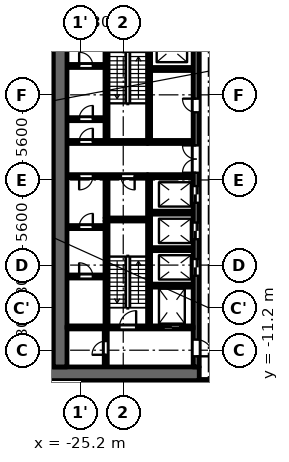
"""IFC4 building model, lengths in metres.
Left out: names, types, materials, properties, quantities, classifications, styles, units other than length and angle.
Written with IfcOpenShell. Run it as: python <this file> out.ifc"""

import sys

from ifc_helpers import new_model, si_unit, direction, frame, frame_2d, origin, origin_2d, place, context, subcontext, project, spatial, polyline, rectangle, outline, extrude, element, fill, save


model = new_model("IFC4")
c1 = context("Model", 3, precision=1e-05, world=origin(), true_north=direction((0.0, 1.0)))
c2 = subcontext(c1, "Body", "Model", "MODEL_VIEW")
j1 = project(units=[si_unit("LENGTHUNIT", "METRE"), si_unit("PLANEANGLEUNIT", "RADIAN")], contexts=[c1])
p1 = place(None, origin())
s1 = spatial("IfcSite", under=j1, at=p1, CompositionType="ELEMENT")
p2 = place(p1, origin())
s2 = spatial("IfcBuilding", under=s1, at=p2, CompositionType="ELEMENT")
p3 = place(p2, frame((0.0, 0.0, -4.5)))
s3 = spatial("IfcBuildingStorey", under=s2, at=p3, CompositionType="ELEMENT", Elevation=-4.5)
p4 = place(p3, frame((0.0, 0.0, -0.5)))
e1 = element("IfcWall", 1, at=p4, inside=s3, PredefinedType="SOLIDWALL", context=c2, shape_type="SweptSolid", body=[
    extrude(outline(polyline([(-28.944, -17.191), (-27.425, -19.426), (-26.851, -20.0), (-26.144, -20.0), (-27.038, -19.105), (-28.472, -16.996), (-28.95, -14.49), (-28.95, -10.0), (-29.45, -10.0), (-29.45, -14.537), (-28.944, -17.191)])), origin(), (0.0, 0.0, 1.0), 5.0),
])
for number, where, z_axis, x_axis in (
    (2, (-28.0, 5.6, 0.0), (0.0, 0.0, 1.0), (1.0, 0.0, 0.0)),
    (3, (-28.0, 0.0, 0.0), (0.0, 0.0, 1.0), (1.0, 0.0, 0.0)),
    (4, (-28.0, -5.6, 0.0), (0.0, 0.0, 1.0), (1.0, 0.0, 0.0)),
    (5, (-28.0, -11.2, 0.0), (0.0, 0.0, 1.0), (1.0, 0.0, 0.0)),
):
    element("IfcColumn", number, at=place(p3, frame(where, z_axis=z_axis, x_axis=x_axis)), inside=s3, PredefinedType="COLUMN", context=c2, shape_type="SweptSolid", body=[
        extrude(rectangle(XDim=1.8, YDim=1.8, at=origin_2d()), origin(), (0.0, 0.0, 1.0), 4.5),
    ])
p5 = place(p3, frame((-23.5, -2.5, 0.0), z_axis=(0.0, 0.0, 1.0), x_axis=(0.0, 1.0, 0.0)))
e6 = element("IfcWall", 6, at=p5, inside=s3, PredefinedType="PARTITIONING", context=c2, shape_type="SweptSolid", body=[
    extrude(rectangle(XDim=2.65, YDim=0.2, at=frame_2d((1.325, 0.0))), origin(), (0.0, 0.0, 1.0), 4.05),
])
p6 = place(p3, frame((-20.7, 2.6, 0.0), z_axis=(0.0, 0.0, 1.0), x_axis=(0.0, 1.0, 0.0)))
e7 = element("IfcWall", 7, at=p6, inside=s3, PredefinedType="SHEAR", context=c2, shape_type="SweptSolid", body=[
    extrude(rectangle(XDim=7.0, YDim=0.2, at=frame_2d((3.5, 0.0))), origin(), (0.0, 0.0, 1.0), 4.05),
])
p7 = place(p3, frame((-20.7, -9.6, 0.0), z_axis=(0.0, 0.0, 1.0), x_axis=(0.0, 1.0, 0.0)))
e8 = element("IfcWall", 8, at=p7, inside=s3, PredefinedType="SHEAR", context=c2, shape_type="SweptSolid", body=[
    extrude(rectangle(XDim=9.75, YDim=0.2, at=frame_2d((4.875, 0.0))), origin(), (0.0, 0.0, 1.0), 4.05),
])
p8 = place(p3, frame((-20.8, 2.5, 0.0), z_axis=(0.0, 0.0, 1.0), x_axis=(-1.0, 0.0, 0.0)))
e9 = element("IfcWall", 9, at=p8, inside=s3, PredefinedType="SHEAR", context=c2, shape_type="SweptSolid", body=[
    extrude(rectangle(XDim=5.3, YDim=0.2, at=frame_2d((2.65, 0.0))), origin(), (0.0, 0.0, 1.0), 4.05),
])
p9 = place(p8, frame((3.6, 0.0, 0.0)))
e10 = element("IfcOpeningElement", 10, at=p9, cuts=e9, PredefinedType="OPENING", context=c2, shape_type="SweptSolid", body=[
    extrude(rectangle(XDim=0.9, YDim=2.1, at=frame_2d((0.45, 1.05))), frame((0.0, 0.11, 0.0), z_axis=(0.0, -1.0, 0.0), x_axis=(1.0, 0.0, 0.0)), (0.0, 0.0, 1.0), 0.22),
])
p10 = place(p3, frame((-20.8, 0.25, 0.0), z_axis=(0.0, 0.0, 1.0), x_axis=(-1.0, 0.0, 0.0)))
e11 = element("IfcWall", 11, at=p10, inside=s3, PredefinedType="PARTITIONING", context=c2, shape_type="SweptSolid", body=[
    extrude(rectangle(XDim=5.3, YDim=0.2, at=frame_2d((2.65, 0.0))), origin(), (0.0, 0.0, 1.0), 4.05),
])
p11 = place(p10, frame((0.85, 0.0, 0.0)))
e12 = element("IfcOpeningElement", 12, at=p11, cuts=e11, PredefinedType="OPENING", context=c2, shape_type="SweptSolid", body=[
    extrude(rectangle(XDim=0.9, YDim=2.1, at=frame_2d((0.45, 1.05))), frame((0.0, 0.11, 0.0), z_axis=(0.0, -1.0, 0.0), x_axis=(1.0, 0.0, 0.0)), (0.0, 0.0, 1.0), 0.22),
])
p12 = place(p10, frame((3.6, 0.0, 0.0)))
e13 = element("IfcOpeningElement", 13, at=p12, cuts=e11, PredefinedType="OPENING", context=c2, shape_type="SweptSolid", body=[
    extrude(rectangle(XDim=0.9, YDim=2.1, at=frame_2d((0.45, 1.05))), frame((0.0, 0.11, 0.0), z_axis=(0.0, -1.0, 0.0), x_axis=(1.0, 0.0, 0.0)), (0.0, 0.0, 1.0), 0.22),
])
p13 = place(p3, frame((-17.4, -12.75, 0.0), z_axis=(0.0, 0.0, 1.0), x_axis=(-1.0, 0.0, 0.0)))
e14 = element("IfcWall", 14, at=p13, inside=s3, PredefinedType="SHEAR", context=c2, shape_type="SweptSolid", body=[
    extrude(rectangle(XDim=10.4, YDim=0.9, at=frame_2d((5.2, 0.0))), origin(), (0.0, 0.0, 1.0), 4.05),
])
p14 = place(p3, frame((-17.6, -12.3, 0.0), z_axis=(0.0, 0.0, 1.0), x_axis=(0.0, 1.0, 0.0)))
e15 = element("IfcWall", 15, at=p14, inside=s3, PredefinedType="SHEAR", context=c2, shape_type="SweptSolid", body=[
    extrude(rectangle(XDim=24.6, YDim=0.4, at=frame_2d((12.3, 0.0))), origin(), (0.0, 0.0, 1.0), 4.05),
])
p15 = place(p14, frame((6.0, 0.0, 0.0)))
e16 = element("IfcOpeningElement", 16, at=p15, cuts=e15, PredefinedType="OPENING", context=c2, shape_type="SweptSolid", body=[
    extrude(rectangle(XDim=1.1, YDim=2.1, at=frame_2d((0.55, 1.05))), frame((0.0, 0.21, 0.0), z_axis=(0.0, -1.0, 0.0), x_axis=(1.0, 0.0, 0.0)), (0.0, 0.0, 1.0), 0.42),
])
p16 = place(p14, frame((8.4, 0.0, 0.0)))
e17 = element("IfcOpeningElement", 17, at=p16, cuts=e15, PredefinedType="OPENING", context=c2, shape_type="SweptSolid", body=[
    extrude(rectangle(XDim=1.1, YDim=2.1, at=frame_2d((0.55, 1.05))), frame((0.0, 0.21, 0.0), z_axis=(0.0, -1.0, 0.0), x_axis=(1.0, 0.0, 0.0)), (0.0, 0.0, 1.0), 0.42),
])
p17 = place(p14, frame((10.8, 0.0, 0.0)))
e18 = element("IfcOpeningElement", 18, at=p17, cuts=e15, PredefinedType="OPENING", context=c2, shape_type="SweptSolid", body=[
    extrude(rectangle(XDim=1.1, YDim=2.1, at=frame_2d((0.55, 1.05))), frame((0.0, 0.21, 0.0), z_axis=(0.0, -1.0, 0.0), x_axis=(1.0, 0.0, 0.0)), (0.0, 0.0, 1.0), 0.42),
])
p18 = place(p14, frame((16.75, 0.0, 0.0)))
e19 = element("IfcOpeningElement", 19, at=p18, cuts=e15, PredefinedType="OPENING", context=c2, shape_type="SweptSolid", body=[
    extrude(rectangle(XDim=0.9, YDim=2.1, at=frame_2d((0.45, 1.05))), frame((0.0, 0.21, 0.0), z_axis=(0.0, -1.0, 0.0), x_axis=(1.0, 0.0, 0.0)), (0.0, 0.0, 1.0), 0.42),
])
p19 = place(p14, frame((22.8, 0.0, 0.0)))
e20 = element("IfcOpeningElement", 20, at=p19, cuts=e15, PredefinedType="OPENING", context=c2, shape_type="SweptSolid", body=[
    extrude(rectangle(XDim=1.1, YDim=2.1, at=frame_2d((0.55, 1.05))), frame((0.0, 0.21, 0.0), z_axis=(0.0, -1.0, 0.0), x_axis=(1.0, 0.0, 0.0)), (0.0, 0.0, 1.0), 0.42),
])
p20 = place(p14, frame((0.7, 0.0, 0.0)))
e21 = element("IfcOpeningElement", 21, at=p20, cuts=e15, PredefinedType="OPENING", context=c2, shape_type="SweptSolid", body=[
    extrude(rectangle(XDim=1.1, YDim=2.1, at=frame_2d((0.55, 1.05))), frame((0.0, 0.21, 0.0), z_axis=(0.0, -1.0, 0.0), x_axis=(1.0, 0.0, 0.0)), (0.0, 0.0, 1.0), 0.42),
])
p21 = place(p14, frame((12.775, 0.0, 0.0)))
e22 = element("IfcOpeningElement", 22, at=p21, cuts=e15, PredefinedType="OPENING", context=c2, shape_type="SweptSolid", body=[
    extrude(rectangle(XDim=1.8, YDim=2.1, at=frame_2d((0.9, 1.05))), frame((0.0, 0.21, 0.0), z_axis=(0.0, -1.0, 0.0), x_axis=(1.0, 0.0, 0.0)), (0.0, 0.0, 1.0), 0.42),
])
p22 = place(p3, frame((-26.55, -12.3, 0.0), z_axis=(0.0, 0.0, 1.0), x_axis=(0.0, 1.0, 0.0)))
e23 = element("IfcWall", 23, at=p22, inside=s3, PredefinedType="SHEAR", context=c2, shape_type="SweptSolid", body=[
    extrude(rectangle(XDim=24.6, YDim=0.9, at=frame_2d((12.3, 0.0))), origin(), (0.0, 0.0, 1.0), 4.05),
])
p23 = place(p3, frame((-23.55, -12.3, 0.0), z_axis=(0.0, 0.0, 1.0), x_axis=(0.0, 1.0, 0.0)))
e24 = element("IfcWall", 24, at=p23, inside=s3, PredefinedType="PARTITIONING", context=c2, shape_type="SweptSolid", body=[
    extrude(rectangle(XDim=2.5, YDim=0.2, at=frame_2d((1.25, 0.0))), origin(), (0.0, 0.0, 1.0), 4.05),
])
p24 = place(p23, frame((0.8, 0.0, 0.0)))
e25 = element("IfcOpeningElement", 25, at=p24, cuts=e24, PredefinedType="OPENING", context=c2, shape_type="SweptSolid", body=[
    extrude(rectangle(XDim=0.9, YDim=2.1, at=frame_2d((0.45, 1.05))), frame((0.0, 0.11, 0.0), z_axis=(0.0, -1.0, 0.0), x_axis=(1.0, 0.0, 0.0)), (0.0, 0.0, 1.0), 0.22),
])
p25 = place(p3, frame((-23.6, -6.35, 0.0), z_axis=(0.0, 0.0, 1.0), x_axis=(-1.0, 0.0, 0.0)))
e26 = element("IfcWall", 26, at=p25, inside=s3, PredefinedType="PARTITIONING", context=c2, shape_type="SweptSolid", body=[
    extrude(rectangle(XDim=2.5, YDim=0.2, at=frame_2d((1.25, 0.0))), origin(), (0.0, 0.0, 1.0), 4.05),
])
p26 = place(p25, frame((0.8, 0.0, 0.0)))
e27 = element("IfcOpeningElement", 27, at=p26, cuts=e26, PredefinedType="OPENING", context=c2, shape_type="SweptSolid", body=[
    extrude(rectangle(XDim=0.9, YDim=2.1, at=frame_2d((0.45, 1.05))), frame((0.0, 0.11, 0.0), z_axis=(0.0, -1.0, 0.0), x_axis=(1.0, 0.0, 0.0)), (0.0, 0.0, 1.0), 0.22),
])
p27 = place(p3, frame((-23.6, -3.1, 0.0), z_axis=(0.0, 0.0, 1.0), x_axis=(-1.0, 0.0, 0.0)))
e28 = element("IfcWall", 28, at=p27, inside=s3, PredefinedType="PARTITIONING", context=c2, shape_type="SweptSolid", body=[
    extrude(rectangle(XDim=2.5, YDim=0.2, at=frame_2d((1.25, 0.0))), origin(), (0.0, 0.0, 1.0), 4.05),
])
p28 = place(p27, frame((0.8, 0.0, 0.0)))
e29 = element("IfcOpeningElement", 29, at=p28, cuts=e28, PredefinedType="OPENING", context=c2, shape_type="SweptSolid", body=[
    extrude(rectangle(XDim=0.9, YDim=2.1, at=frame_2d((0.45, 1.05))), frame((0.0, 0.11, 0.0), z_axis=(0.0, -1.0, 0.0), x_axis=(1.0, 0.0, 0.0)), (0.0, 0.0, 1.0), 0.22),
])
p29 = place(p3, frame((-23.6, 4.0, 0.0), z_axis=(0.0, 0.0, 1.0), x_axis=(-1.0, 0.0, 0.0)))
e30 = element("IfcWall", 30, at=p29, inside=s3, PredefinedType="PARTITIONING", context=c2, shape_type="SweptSolid", body=[
    extrude(rectangle(XDim=2.5, YDim=0.2, at=frame_2d((1.25, 0.0))), origin(), (0.0, 0.0, 1.0), 4.05),
])
p30 = place(p29, frame((0.8, 0.0, 0.0)))
e31 = element("IfcOpeningElement", 31, at=p30, cuts=e30, PredefinedType="OPENING", context=c2, shape_type="SweptSolid", body=[
    extrude(rectangle(XDim=0.9, YDim=2.1, at=frame_2d((0.45, 1.05))), frame((0.0, 0.11, 0.0), z_axis=(0.0, -1.0, 0.0), x_axis=(1.0, 0.0, 0.0)), (0.0, 0.0, 1.0), 0.22),
])
p31 = place(p3, frame((-23.6, 7.5, 0.0), z_axis=(0.0, 0.0, 1.0), x_axis=(-1.0, 0.0, 0.0)))
e32 = element("IfcWall", 32, at=p31, inside=s3, PredefinedType="PARTITIONING", context=c2, shape_type="SweptSolid", body=[
    extrude(rectangle(XDim=2.5, YDim=0.2, at=frame_2d((1.25, 0.0))), origin(), (0.0, 0.0, 1.0), 4.05),
])
p32 = place(p31, frame((0.8, 0.0, 0.0)))
e33 = element("IfcOpeningElement", 33, at=p32, cuts=e32, PredefinedType="OPENING", context=c2, shape_type="SweptSolid", body=[
    extrude(rectangle(XDim=0.9, YDim=2.1, at=frame_2d((0.45, 1.05))), frame((0.0, 0.11, 0.0), z_axis=(0.0, -1.0, 0.0), x_axis=(1.0, 0.0, 0.0)), (0.0, 0.0, 1.0), 0.22),
])
p33 = place(p3, frame((-17.8, -9.7, 0.0), z_axis=(0.0, 0.0, 1.0), x_axis=(-1.0, 0.0, 0.0)))
e34 = element("IfcWall", 34, at=p33, inside=s3, PredefinedType="SHEAR", context=c2, shape_type="SweptSolid", body=[
    extrude(rectangle(XDim=8.3, YDim=0.2, at=frame_2d((4.15, 0.0))), origin(), (0.0, 0.0, 1.0), 4.05),
])
p34 = place(p33, frame((0.85, 0.0, 0.0)))
e35 = element("IfcOpeningElement", 35, at=p34, cuts=e34, PredefinedType="OPENING", context=c2, shape_type="SweptSolid", body=[
    extrude(rectangle(XDim=1.1, YDim=2.1, at=frame_2d((0.55, 1.05))), frame((0.0, 0.11, 0.0), z_axis=(0.0, -1.0, 0.0), x_axis=(1.0, 0.0, 0.0)), (0.0, 0.0, 1.0), 0.22),
])
p35 = place(p33, frame((3.75, 0.0, 0.0)))
e36 = element("IfcOpeningElement", 36, at=p35, cuts=e34, PredefinedType="OPENING", context=c2, shape_type="SweptSolid", body=[
    extrude(rectangle(XDim=1.1, YDim=2.1, at=frame_2d((0.55, 1.05))), frame((0.0, 0.11, 0.0), z_axis=(0.0, -1.0, 0.0), x_axis=(1.0, 0.0, 0.0)), (0.0, 0.0, 1.0), 0.22),
])
for number, where, z_axis, x_axis in (
    (37, (-17.8, -6.95, 0.0), (0.0, 0.0, 1.0), (-1.0, 0.0, 0.0)),
    (38, (-17.8, -4.55, 0.0), (0.0, 0.0, 1.0), (-1.0, 0.0, 0.0)),
    (39, (-17.8, -2.15, 0.0), (0.0, 0.0, 1.0), (-1.0, 0.0, 0.0)),
):
    element("IfcWall", number, at=place(p3, frame(where, z_axis=z_axis, x_axis=x_axis)), inside=s3, PredefinedType="PARTITIONING", context=c2, shape_type="SweptSolid", body=[
        extrude(rectangle(XDim=2.8, YDim=0.2, at=frame_2d((1.4, 0.0))), origin(), (0.0, 0.0, 1.0), 4.05),
    ])
for number, where, z_axis, x_axis in (
    (40, (-17.8, 0.25, 0.0), (0.0, 0.0, 1.0), (-1.0, 0.0, 0.0)),
    (41, (-17.8, 2.5, 0.0), (0.0, 0.0, 1.0), (-1.0, 0.0, 0.0)),
):
    element("IfcWall", number, at=place(p3, frame(where, z_axis=z_axis, x_axis=x_axis)), inside=s3, PredefinedType="PARTITIONING", context=c2, shape_type="SweptSolid", body=[
        extrude(rectangle(XDim=3.0, YDim=0.2, at=frame_2d((1.5, 0.0))), origin(), (0.0, 0.0, 1.0), 4.05),
    ])
p36 = place(p3, frame((-17.8, 7.3, 0.0), z_axis=(0.0, 0.0, 1.0), x_axis=(-1.0, 0.0, 0.0)))
e42 = element("IfcWall", 42, at=p36, inside=s3, PredefinedType="PARTITIONING", context=c2, shape_type="SweptSolid", body=[
    extrude(rectangle(XDim=2.8, YDim=0.2, at=frame_2d((1.4, 0.0))), origin(), (0.0, 0.0, 1.0), 4.05),
])
p37 = place(p3, frame((-23.5, 2.6, 0.0), z_axis=(0.0, 0.0, 1.0), x_axis=(0.0, 1.0, 0.0)))
e43 = element("IfcWall", 43, at=p37, inside=s3, PredefinedType="SHEAR", context=c2, shape_type="SweptSolid", body=[
    extrude(rectangle(XDim=7.0, YDim=0.2, at=frame_2d((3.5, 0.0))), origin(), (0.0, 0.0, 1.0), 4.05),
])
p38 = place(p3, frame((-23.5, -9.6, 0.0), z_axis=(0.0, 0.0, 1.0), x_axis=(0.0, 1.0, 0.0)))
e44 = element("IfcWall", 44, at=p38, inside=s3, PredefinedType="SHEAR", context=c2, shape_type="SweptSolid", body=[
    extrude(rectangle(XDim=6.9, YDim=0.2, at=frame_2d((3.45, 0.0))), origin(), (0.0, 0.0, 1.0), 4.05),
])
p39 = place(p3, frame((-20.8, -2.6, 0.0), z_axis=(0.0, 0.0, 1.0), x_axis=(-1.0, 0.0, 0.0)))
e45 = element("IfcWall", 45, at=p39, inside=s3, PredefinedType="SHEAR", context=c2, shape_type="SweptSolid", body=[
    extrude(rectangle(XDim=2.8, YDim=0.2, at=frame_2d((1.4, 0.0))), origin(), (0.0, 0.0, 1.0), 4.05),
])
p40 = place(p3, frame((-17.4, -13.2, 0.0), z_axis=(0.0, 0.0, 1.0), x_axis=(1.0, 0.0, 0.0)))
e46 = element("IfcWall", 46, at=p40, inside=s3, PredefinedType="PARTITIONING", context=c2, shape_type="SweptSolid", body=[
    extrude(rectangle(XDim=34.8, YDim=0.15, at=frame_2d((17.4, 0.0))), origin(), (0.0, 0.0, 1.0), 4.05),
])
p41 = place(p40, frame((16.05, 0.0, 0.0)))
e47 = element("IfcOpeningElement", 47, at=p41, cuts=e46, PredefinedType="OPENING", context=c2, shape_type="SweptSolid", body=[
    extrude(rectangle(XDim=1.2, YDim=2.1, at=frame_2d((0.6, 1.05))), frame((0.0, 0.085, 0.0), z_axis=(0.0, -1.0, 0.0), x_axis=(1.0, 0.0, 0.0)), (0.0, 0.0, 1.0), 0.17),
])
p42 = place(p40, frame((0.65, 0.0, 0.0)))
e48 = element("IfcOpeningElement", 48, at=p42, cuts=e46, PredefinedType="OPENING", context=c2, shape_type="SweptSolid", body=[
    extrude(rectangle(XDim=1.0, YDim=2.1, at=frame_2d((0.5, 1.05))), frame((0.0, 0.085, 0.0), z_axis=(0.0, -1.0, 0.0), x_axis=(1.0, 0.0, 0.0)), (0.0, 0.0, 1.0), 0.17),
])
p43 = place(p40, frame((33.05, 0.0, 0.0)))
e49 = element("IfcOpeningElement", 49, at=p43, cuts=e46, PredefinedType="OPENING", context=c2, shape_type="SweptSolid", body=[
    extrude(rectangle(XDim=1.0, YDim=2.1, at=frame_2d((0.5, 1.05))), frame((0.0, 0.085, 0.0), z_axis=(0.0, -1.0, 0.0), x_axis=(1.0, 0.0, 0.0)), (0.0, 0.0, 1.0), 0.17),
])
p44 = place(p34, origin())
e50 = element("IfcDoor", 50, at=p44, inside=s3, OperationType="DOUBLE_DOOR_SLIDING", PredefinedType="DOOR", context=c2, shape_type="SweptSolid", body=[
    extrude(rectangle(XDim=1.1, YDim=2.1, at=frame_2d((0.55, 1.05))), frame((0.0, 0.025, 0.0), z_axis=(0.0, -1.0, 0.0), x_axis=(1.0, 0.0, 0.0)), (0.0, 0.0, 1.0), 0.05),
])
fill(e35, e50)
p45 = place(p15, origin())
e51 = element("IfcDoor", 51, at=p45, inside=s3, OperationType="DOUBLE_DOOR_SLIDING", PredefinedType="DOOR", context=c2, shape_type="SweptSolid", body=[
    extrude(rectangle(XDim=1.1, YDim=2.1, at=frame_2d((0.55, 1.05))), frame((0.0, 0.025, 0.0), z_axis=(0.0, -1.0, 0.0), x_axis=(1.0, 0.0, 0.0)), (0.0, 0.0, 1.0), 0.05),
])
fill(e16, e51)
p46 = place(p16, origin())
e52 = element("IfcDoor", 52, at=p46, inside=s3, OperationType="DOUBLE_DOOR_SLIDING", PredefinedType="DOOR", context=c2, shape_type="SweptSolid", body=[
    extrude(rectangle(XDim=1.1, YDim=2.1, at=frame_2d((0.55, 1.05))), frame((0.0, 0.025, 0.0), z_axis=(0.0, -1.0, 0.0), x_axis=(1.0, 0.0, 0.0)), (0.0, 0.0, 1.0), 0.05),
])
fill(e17, e52)
p47 = place(p17, origin())
e53 = element("IfcDoor", 53, at=p47, inside=s3, OperationType="DOUBLE_DOOR_SLIDING", PredefinedType="DOOR", context=c2, shape_type="SweptSolid", body=[
    extrude(rectangle(XDim=1.1, YDim=2.1, at=frame_2d((0.55, 1.05))), frame((0.0, 0.025, 0.0), z_axis=(0.0, -1.0, 0.0), x_axis=(1.0, 0.0, 0.0)), (0.0, 0.0, 1.0), 0.05),
])
fill(e18, e53)
p48 = place(p18, origin())
e54 = element("IfcDoor", 54, at=p48, inside=s3, OperationType="SINGLE_SWING_LEFT", PredefinedType="DOOR", context=c2, shape_type="SweptSolid", body=[
    extrude(rectangle(XDim=0.9, YDim=2.1, at=frame_2d((0.45, 1.05))), frame((0.0, 0.025, 0.0), z_axis=(0.0, -1.0, 0.0), x_axis=(1.0, 0.0, 0.0)), (0.0, 0.0, 1.0), 0.05),
])
fill(e19, e54)
p49 = place(p20, origin())
e55 = element("IfcDoor", 55, at=p49, inside=s3, OperationType="SINGLE_SWING_LEFT", PredefinedType="DOOR", context=c2, shape_type="SweptSolid", body=[
    extrude(rectangle(XDim=1.1, YDim=2.1, at=frame_2d((0.55, 1.05))), frame((0.0, 0.025, 0.0), z_axis=(0.0, -1.0, 0.0), x_axis=(1.0, 0.0, 0.0)), (0.0, 0.0, 1.0), 0.05),
])
fill(e21, e55)
p50 = place(p24, origin())
e56 = element("IfcDoor", 56, at=p50, inside=s3, OperationType="SINGLE_SWING_RIGHT", PredefinedType="DOOR", context=c2, shape_type="SweptSolid", body=[
    extrude(rectangle(XDim=0.9, YDim=2.1, at=frame_2d((0.45, 1.05))), frame((0.0, 0.025, 0.0), z_axis=(0.0, -1.0, 0.0), x_axis=(1.0, 0.0, 0.0)), (0.0, 0.0, 1.0), 0.05),
])
fill(e25, e56)
p51 = place(p35, origin())
e57 = element("IfcDoor", 57, at=p51, inside=s3, OperationType="SINGLE_SWING_LEFT", PredefinedType="DOOR", context=c2, shape_type="SweptSolid", body=[
    extrude(rectangle(XDim=1.1, YDim=2.1, at=frame_2d((0.55, 1.05))), frame((0.0, 0.025, 0.0), z_axis=(0.0, -1.0, 0.0), x_axis=(1.0, 0.0, 0.0)), (0.0, 0.0, 1.0), 0.05),
])
fill(e36, e57)
p52 = place(p21, origin())
e58 = element("IfcDoor", 58, at=p52, inside=s3, OperationType="DOUBLE_DOOR_SINGLE_SWING", PredefinedType="DOOR", context=c2, shape_type="SweptSolid", body=[
    extrude(rectangle(XDim=1.8, YDim=2.1, at=frame_2d((0.9, 1.05))), frame((0.0, 0.025, 0.0), z_axis=(0.0, -1.0, 0.0), x_axis=(1.0, 0.0, 0.0)), (0.0, 0.0, 1.0), 0.05),
])
fill(e22, e58)
p53 = place(p11, origin())
e59 = element("IfcDoor", 59, at=p53, inside=s3, OperationType="SINGLE_SWING_RIGHT", PredefinedType="DOOR", context=c2, shape_type="SweptSolid", body=[
    extrude(rectangle(XDim=0.9, YDim=2.1, at=frame_2d((0.45, 1.05))), frame((0.0, 0.025, 0.0), z_axis=(0.0, -1.0, 0.0), x_axis=(1.0, 0.0, 0.0)), (0.0, 0.0, 1.0), 0.05),
])
fill(e12, e59)
p54 = place(p26, origin())
e60 = element("IfcDoor", 60, at=p54, inside=s3, OperationType="SINGLE_SWING_RIGHT", PredefinedType="DOOR", context=c2, shape_type="SweptSolid", body=[
    extrude(rectangle(XDim=0.9, YDim=2.1, at=frame_2d((0.45, 1.05))), frame((0.0, 0.025, 0.0), z_axis=(0.0, -1.0, 0.0), x_axis=(1.0, 0.0, 0.0)), (0.0, 0.0, 1.0), 0.05),
])
fill(e27, e60)
p55 = place(p28, origin())
e61 = element("IfcDoor", 61, at=p55, inside=s3, OperationType="SINGLE_SWING_LEFT", PredefinedType="DOOR", context=c2, shape_type="SweptSolid", body=[
    extrude(rectangle(XDim=0.9, YDim=2.1, at=frame_2d((0.45, 1.05))), frame((0.0, 0.025, 0.0), z_axis=(0.0, -1.0, 0.0), x_axis=(1.0, 0.0, 0.0)), (0.0, 0.0, 1.0), 0.05),
])
fill(e29, e61)
p56 = place(p12, origin())
e62 = element("IfcDoor", 62, at=p56, inside=s3, OperationType="SINGLE_SWING_LEFT", PredefinedType="DOOR", context=c2, shape_type="SweptSolid", body=[
    extrude(rectangle(XDim=0.9, YDim=2.1, at=frame_2d((0.45, 1.05))), frame((0.0, 0.025, 0.0), z_axis=(0.0, -1.0, 0.0), x_axis=(1.0, 0.0, 0.0)), (0.0, 0.0, 1.0), 0.05),
])
fill(e13, e62)
p57 = place(p30, origin())
e63 = element("IfcDoor", 63, at=p57, inside=s3, OperationType="SINGLE_SWING_LEFT", PredefinedType="DOOR", context=c2, shape_type="SweptSolid", body=[
    extrude(rectangle(XDim=0.9, YDim=2.1, at=frame_2d((0.45, 1.05))), frame((0.0, 0.025, 0.0), z_axis=(0.0, -1.0, 0.0), x_axis=(1.0, 0.0, 0.0)), (0.0, 0.0, 1.0), 0.05),
])
fill(e31, e63)
p58 = place(p32, origin())
e64 = element("IfcDoor", 64, at=p58, inside=s3, OperationType="SINGLE_SWING_RIGHT", PredefinedType="DOOR", context=c2, shape_type="SweptSolid", body=[
    extrude(rectangle(XDim=0.9, YDim=2.1, at=frame_2d((0.45, 1.05))), frame((0.0, 0.025, 0.0), z_axis=(0.0, -1.0, 0.0), x_axis=(1.0, 0.0, 0.0)), (0.0, 0.0, 1.0), 0.05),
])
fill(e33, e64)
p59 = place(p9, origin())
e65 = element("IfcDoor", 65, at=p59, inside=s3, OperationType="SINGLE_SWING_LEFT", PredefinedType="DOOR", context=c2, shape_type="SweptSolid", body=[
    extrude(rectangle(XDim=0.9, YDim=2.1, at=frame_2d((0.45, 1.05))), frame((0.0, 0.025, 0.0), z_axis=(0.0, -1.0, 0.0), x_axis=(1.0, 0.0, 0.0)), (0.0, 0.0, 1.0), 0.05),
])
fill(e10, e65)
save(model, sys.argv[1])
